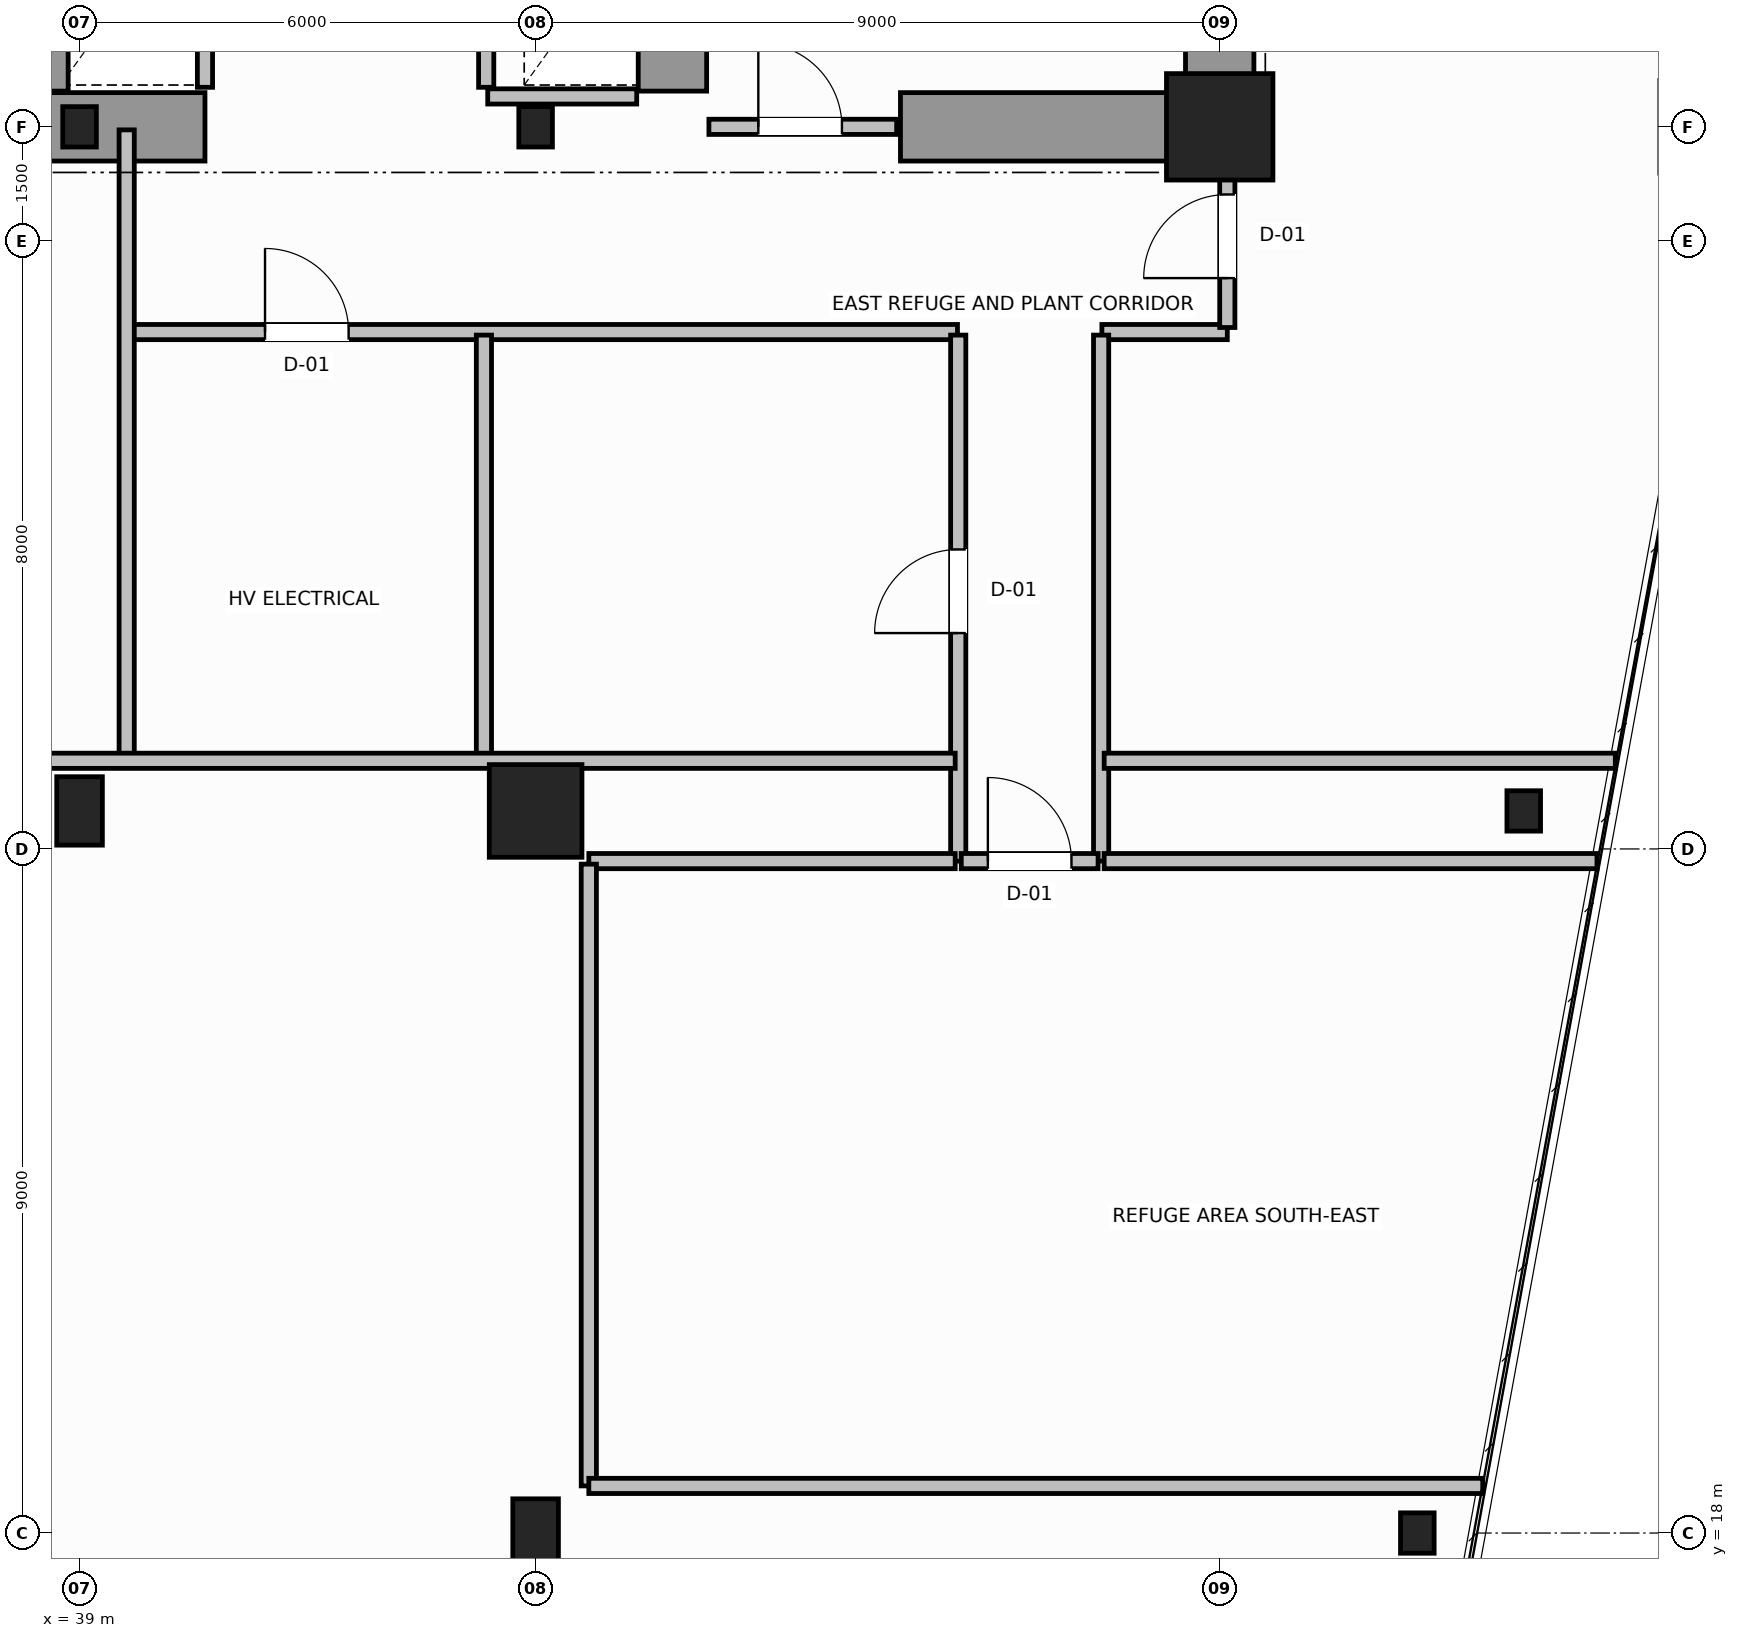
"""IFC4 building model, lengths in metres.
Left out: names, types, materials, properties, quantities, classifications, styles, units other than length and angle.
Written with IfcOpenShell. Run it as: python <this file> out.ifc"""

import sys

from ifc_helpers import new_model, si_unit, direction, frame, frame_2d, origin, origin_2d, place, context, subcontext, project, spatial, rectangle, hollow_rectangle, hollow_circle, i_section, extrude, source, transform, mapped, element, fill, save


model = new_model("IFC4")
c1 = context("Model", 3, precision=1e-05, world=origin(), true_north=direction((0.0, 1.0)))
c2 = subcontext(c1, "Body", "Model", "MODEL_VIEW")
j1 = project(units=[si_unit("LENGTHUNIT", "METRE"), si_unit("PLANEANGLEUNIT", "RADIAN")], contexts=[c1])
p1 = place(None, origin())
s1 = spatial("IfcSite", under=j1, at=p1, CompositionType="ELEMENT")
p2 = place(p1, origin())
s2 = spatial("IfcBuilding", under=s1, at=p2, CompositionType="ELEMENT")
p3 = place(p2, frame((0.0, 0.0, 83.4)))
s3 = spatial("IfcBuildingStorey", under=s2, at=p3, CompositionType="ELEMENT", Elevation=83.4)
m1 = source(origin(), c2, "Body", "SweptSolid", [
    extrude(i_section(OverallWidth=0.442, OverallDepth=0.531, WebThickness=0.065, FlangeThickness=0.076, FilletRadius=0.015, at=origin_2d()), origin(), (0.0, 0.0, 1.0), 4.8),
])
for number, where, z_axis, x_axis in (
    (1, (39.0, 36.5, 0.0), (0.0, 0.0, 1.0), (1.0, 0.0, 0.0)),
    (2, (45.0, 36.5, 0.0), (0.0, 0.0, 1.0), (1.0, 0.0, 0.0)),
):
    element("IfcColumn", number, at=place(p3, frame(where, z_axis=z_axis, x_axis=x_axis)), inside=s3, PredefinedType="COLUMN", context=c2, shape_type="MappedRepresentation", body=[
        mapped(m1, transform((0.0, 0.0, 0.0), scale=1.0)),
    ])
m2 = source(origin(), c2, "Body", "SweptSolid", [
    extrude(rectangle(XDim=1.4, YDim=1.4, at=origin_2d()), origin(), (0.0, 0.0, 1.0), 4.8),
])
p4 = place(p3, frame((54.0, 36.5, 0.0), z_axis=(0.0, 0.0, 1.0), x_axis=(1.0, 0.0, 0.0)))
e3 = element("IfcColumn", 3, at=p4, inside=s3, PredefinedType="COLUMN", context=c2, shape_type="MappedRepresentation", body=[
    mapped(m2, transform((0.0, 0.0, 0.0), scale=1.0)),
])
m3 = source(origin(), c2, "Body", "SweptSolid", [
    extrude(i_section(OverallWidth=0.442, OverallDepth=0.531, WebThickness=0.065, FlangeThickness=0.076, FilletRadius=0.015, at=origin_2d()), origin(), (0.0, 0.0, 1.0), 4.8),
])
for number, where, z_axis, x_axis in (
    (4, (58.0, 27.5, 0.0), (0.0, 0.0, 1.0), (1.0, 0.0, 0.0)),
    (5, (56.6, 18.0, 0.0), (0.0, 0.0, 1.0), (1.0, 0.0, 0.0)),
):
    element("IfcColumn", number, at=place(p3, frame(where, z_axis=z_axis, x_axis=x_axis)), inside=s3, PredefinedType="COLUMN", context=c2, shape_type="MappedRepresentation", body=[
        mapped(m3, transform((0.0, 0.0, 0.0), scale=1.0)),
    ])
m4 = source(origin(), c2, "Body", "SweptSolid", [
    extrude(hollow_rectangle(XDim=0.6, YDim=0.9, WallThickness=0.04, InnerFilletRadius=0.04, OuterFilletRadius=0.08, at=origin_2d()), origin(), (0.0, 0.0, 1.0), 4.8),
])
p5 = place(p3, frame((39.0, 27.5, 0.0), z_axis=(0.0, 0.0, 1.0), x_axis=(1.0, 0.0, 0.0)))
e6 = element("IfcColumn", 6, at=p5, inside=s3, PredefinedType="COLUMN", context=c2, shape_type="MappedRepresentation", body=[
    mapped(m4, transform((0.0, 0.0, 0.0), scale=1.0)),
])
m5 = source(origin(), c2, "Body", "SweptSolid", [
    extrude(hollow_circle(Radius=0.61, WallThickness=0.05, at=origin_2d()), origin(), (0.0, 0.0, 1.0), 4.8),
])
p6 = place(p3, frame((45.0, 27.5, 0.0), z_axis=(0.0, 0.0, 1.0), x_axis=(1.0, 0.0, 0.0)))
e7 = element("IfcColumn", 7, at=p6, inside=s3, PredefinedType="COLUMN", context=c2, shape_type="MappedRepresentation", body=[
    mapped(m5, transform((0.0, 0.0, 0.0), scale=1.0)),
])
p7 = place(p3, frame((45.0, 18.0, 0.0), z_axis=(0.0, 0.0, 1.0), x_axis=(1.0, 0.0, 0.0)))
e8 = element("IfcColumn", 8, at=p7, inside=s3, PredefinedType="COLUMN", context=c2, shape_type="MappedRepresentation", body=[
    mapped(m4, transform((0.0, 0.0, 0.0), scale=1.0)),
])
p8 = place(p3, frame((54.0, 36.5, 0.0), z_axis=(0.0, 0.0, 1.0), x_axis=(0.0, 1.0, 0.0)))
e9 = element("IfcWall", 9, at=p8, inside=s3, PredefinedType="SHEAR", context=c2, shape_type="SweptSolid", body=[
    extrude(rectangle(XDim=14.5, YDim=0.9, at=frame_2d((7.25, 0.0))), origin(), (0.0, 0.0, 1.0), 4.8),
])
p9 = place(p3, frame((36.15, 36.5, 0.0), z_axis=(0.0, 0.0, 1.0), x_axis=(1.0, 0.0, 0.0)))
e10 = element("IfcWall", 10, at=p9, inside=s3, PredefinedType="SHEAR", context=c2, shape_type="SweptSolid", body=[
    extrude(rectangle(XDim=4.5, YDim=0.9, at=frame_2d((2.25, 0.0))), origin(), (0.0, 0.0, 1.0), 4.8),
])
p10 = place(p3, frame((49.8, 36.5, 0.0), z_axis=(0.0, 0.0, 1.0), x_axis=(1.0, 0.0, 0.0)))
e11 = element("IfcWall", 11, at=p10, inside=s3, PredefinedType="SHEAR", context=c2, shape_type="SweptSolid", body=[
    extrude(rectangle(XDim=3.73, YDim=0.9, at=frame_2d((1.865, 0.0))), origin(), (0.0, 0.0, 1.0), 3.34),
])
p11 = place(p3, frame((38.4, 36.97, 0.0), z_axis=(0.0, 0.0, 1.0), x_axis=(0.0, 1.0, 0.0)))
e12 = element("IfcWall", 12, at=p11, inside=s3, PredefinedType="SHEAR", context=c2, shape_type="SweptSolid", body=[
    extrude(rectangle(XDim=9.23, YDim=0.9, at=frame_2d((4.615, 0.0))), origin(), (0.0, 0.0, 1.0), 4.8),
])
p12 = place(p11, frame((4.05, 0.0, 0.0)))
e13 = element("IfcOpeningElement", 13, at=p12, cuts=e12, PredefinedType="OPENING", context=c2, shape_type="SweptSolid", body=[
    extrude(rectangle(XDim=1.1, YDim=2.15, at=frame_2d((0.55, 1.075))), frame((0.0, 0.46, 0.0), z_axis=(0.0, -1.0, 0.0), x_axis=(1.0, 0.0, 0.0)), (0.0, 0.0, 1.0), 0.92),
])
p13 = place(p3, frame((46.8, 36.97, 0.0), z_axis=(0.0, 0.0, 1.0), x_axis=(0.0, 1.0, 0.0)))
e14 = element("IfcWall", 14, at=p13, inside=s3, PredefinedType="SHEAR", context=c2, shape_type="SweptSolid", body=[
    extrude(rectangle(XDim=9.23, YDim=0.9, at=frame_2d((4.615, 0.0))), origin(), (0.0, 0.0, 1.0), 4.8),
])
p14 = place(p3, frame((47.28, 36.5, 0.0), z_axis=(0.0, 0.0, 1.0), x_axis=(1.0, 0.0, 0.0)))
e15 = element("IfcWall", 15, at=p14, inside=s3, PredefinedType="SOLIDWALL", context=c2, shape_type="SweptSolid", body=[
    extrude(rectangle(XDim=2.47, YDim=0.2, at=frame_2d((1.235, 0.0))), origin(), (0.0, 0.0, 1.0), 3.33),
])
p15 = place(p14, frame((0.65, 0.0, 0.0)))
e16 = element("IfcOpeningElement", 16, at=p15, cuts=e15, PredefinedType="OPENING", context=c2, shape_type="SweptSolid", body=[
    extrude(rectangle(XDim=1.1, YDim=2.15, at=frame_2d((0.55, 1.075))), frame((0.0, 0.11, 0.0), z_axis=(0.0, -1.0, 0.0), x_axis=(1.0, 0.0, 0.0)), (0.0, 0.0, 1.0), 0.22),
])
p16 = place(p3, frame((40.65, 37.02, 0.0), z_axis=(0.0, 0.0, 1.0), x_axis=(0.0, 1.0, 0.0)))
e17 = element("IfcWall", 17, at=p16, inside=s3, PredefinedType="SOLIDWALL", context=c2, shape_type="SweptSolid", body=[
    extrude(rectangle(XDim=2.56, YDim=0.2, at=frame_2d((1.28, 0.0))), origin(), (0.0, 0.0, 1.0), 4.54),
])
p17 = place(p3, frame((44.37, 36.9, 0.0), z_axis=(0.0, 0.0, 1.0), x_axis=(1.0, 0.0, 0.0)))
e18 = element("IfcWall", 18, at=p17, inside=s3, PredefinedType="SOLIDWALL", context=c2, shape_type="SweptSolid", body=[
    extrude(rectangle(XDim=1.96, YDim=0.2, at=frame_2d((0.98, 0.0))), origin(), (0.0, 0.0, 1.0), 3.33),
])
p18 = place(p3, frame((44.35, 37.02, 0.0), z_axis=(0.0, 0.0, 1.0), x_axis=(0.0, 1.0, 0.0)))
e19 = element("IfcWall", 19, at=p18, inside=s3, PredefinedType="SOLIDWALL", context=c2, shape_type="SweptSolid", body=[
    extrude(rectangle(XDim=2.56, YDim=0.2, at=frame_2d((1.28, 0.0))), origin(), (0.0, 0.0, 1.0), 4.54),
])
p19 = place(p3, frame((39.64, 33.8, 0.0), z_axis=(0.0, 0.0, 1.0), x_axis=(1.0, 0.0, 0.0)))
e20 = element("IfcWall", 20, at=p19, inside=s3, PredefinedType="SOLIDWALL", context=c2, shape_type="SweptSolid", body=[
    extrude(rectangle(XDim=10.91, YDim=0.2, at=frame_2d((5.455, 0.0))), origin(), (0.0, 0.0, 1.0), 4.03),
])
p20 = place(p19, frame((1.8, 0.0, 0.0)))
e21 = element("IfcOpeningElement", 21, at=p20, cuts=e20, PredefinedType="OPENING", context=c2, shape_type="SweptSolid", body=[
    extrude(rectangle(XDim=1.1, YDim=2.15, at=frame_2d((0.55, 1.075))), frame((0.0, 0.11, 0.0), z_axis=(0.0, -1.0, 0.0), x_axis=(1.0, 0.0, 0.0)), (0.0, 0.0, 1.0), 0.22),
])
p21 = place(p3, frame((52.45, 33.8, 0.0), z_axis=(0.0, 0.0, 1.0), x_axis=(1.0, 0.0, 0.0)))
e22 = element("IfcWall", 22, at=p21, inside=s3, PredefinedType="SOLIDWALL", context=c2, shape_type="SweptSolid", body=[
    extrude(rectangle(XDim=1.65, YDim=0.2, at=frame_2d((0.825, 0.0))), origin(), (0.0, 0.0, 1.0), 4.03),
])
p22 = place(p3, frame((54.1, 33.86, 0.0), z_axis=(0.0, 0.0, 1.0), x_axis=(0.0, 1.0, 0.0)))
e23 = element("IfcWall", 23, at=p22, inside=s3, PredefinedType="SOLIDWALL", context=c2, shape_type="SweptSolid", body=[
    extrude(rectangle(XDim=2.58, YDim=0.2, at=frame_2d((1.29, 0.0))), origin(), (0.0, 0.0, 1.0), 4.54),
])
p23 = place(p22, frame((0.65, 0.0, 0.0)))
e24 = element("IfcOpeningElement", 24, at=p23, cuts=e23, PredefinedType="OPENING", context=c2, shape_type="SweptSolid", body=[
    extrude(rectangle(XDim=1.1, YDim=2.15, at=frame_2d((0.55, 1.075))), frame((0.0, 0.11, 0.0), z_axis=(0.0, -1.0, 0.0), x_axis=(1.0, 0.0, 0.0)), (0.0, 0.0, 1.0), 0.22),
])
p24 = place(p3, frame((50.56, 26.84, 0.0), z_axis=(0.0, 0.0, 1.0), x_axis=(0.0, 1.0, 0.0)))
e25 = element("IfcWall", 25, at=p24, inside=s3, PredefinedType="SOLIDWALL", context=c2, shape_type="SweptSolid", body=[
    extrude(rectangle(XDim=6.92, YDim=0.2, at=frame_2d((3.46, 0.0))), origin(), (0.0, 0.0, 1.0), 4.54),
])
p25 = place(p24, frame((3.0, 0.0, 0.0)))
e26 = element("IfcOpeningElement", 26, at=p25, cuts=e25, PredefinedType="OPENING", context=c2, shape_type="SweptSolid", body=[
    extrude(rectangle(XDim=1.1, YDim=2.15, at=frame_2d((0.55, 1.075))), frame((0.0, 0.11, 0.0), z_axis=(0.0, -1.0, 0.0), x_axis=(1.0, 0.0, 0.0)), (0.0, 0.0, 1.0), 0.22),
])
p26 = place(p3, frame((52.44, 26.84, 0.0), z_axis=(0.0, 0.0, 1.0), x_axis=(0.0, 1.0, 0.0)))
e27 = element("IfcWall", 27, at=p26, inside=s3, PredefinedType="SOLIDWALL", context=c2, shape_type="SweptSolid", body=[
    extrude(rectangle(XDim=6.92, YDim=0.2, at=frame_2d((3.46, 0.0))), origin(), (0.0, 0.0, 1.0), 4.54),
])
p27 = place(p3, frame((50.6, 26.84, 0.0), z_axis=(0.0, 0.0, 1.0), x_axis=(1.0, 0.0, 0.0)))
e28 = element("IfcWall", 28, at=p27, inside=s3, PredefinedType="SOLIDWALL", context=c2, shape_type="SweptSolid", body=[
    extrude(rectangle(XDim=1.8, YDim=0.2, at=frame_2d((0.9, 0.0))), origin(), (0.0, 0.0, 1.0), 4.54),
])
p28 = place(p27, frame((0.35, 0.0, 0.0)))
e29 = element("IfcOpeningElement", 29, at=p28, cuts=e28, PredefinedType="OPENING", context=c2, shape_type="SweptSolid", body=[
    extrude(rectangle(XDim=1.1, YDim=2.15, at=frame_2d((0.55, 1.075))), frame((0.0, 0.11, 0.0), z_axis=(0.0, -1.0, 0.0), x_axis=(1.0, 0.0, 0.0)), (0.0, 0.0, 1.0), 0.22),
])
p29 = place(p3, frame((39.62, 28.16, 0.0), z_axis=(0.0, 0.0, 1.0), x_axis=(0.0, 1.0, 0.0)))
e30 = element("IfcWall", 30, at=p29, inside=s3, PredefinedType="SOLIDWALL", context=c2, shape_type="SweptSolid", body=[
    extrude(rectangle(XDim=8.3, YDim=0.2, at=frame_2d((4.15, 0.0))), origin(), (0.0, 0.0, 1.0), 4.54),
])
p30 = place(p3, frame((44.32, 28.16, 0.0), z_axis=(0.0, 0.0, 1.0), x_axis=(0.0, 1.0, 0.0)))
e31 = element("IfcWall", 31, at=p30, inside=s3, PredefinedType="SOLIDWALL", context=c2, shape_type="SweptSolid", body=[
    extrude(rectangle(XDim=5.6, YDim=0.2, at=frame_2d((2.8, 0.0))), origin(), (0.0, 0.0, 1.0), 4.54),
])
p31 = place(p3, frame((17.48, 28.16, 0.0), z_axis=(0.0, 0.0, 1.0), x_axis=(1.0, 0.0, 0.0)))
e32 = element("IfcWall", 32, at=p31, inside=s3, PredefinedType="SOLIDWALL", context=c2, shape_type="SweptSolid", body=[
    extrude(rectangle(XDim=33.04, YDim=0.2, at=frame_2d((16.52, 0.0))), origin(), (0.0, 0.0, 1.0), 4.54),
])
p32 = place(p3, frame((52.48, 28.16, 0.0), z_axis=(0.0, 0.0, 1.0), x_axis=(1.0, 0.0, 0.0)))
e33 = element("IfcWall", 33, at=p32, inside=s3, PredefinedType="SOLIDWALL", context=c2, shape_type="SweptSolid", body=[
    extrude(rectangle(XDim=6.725, YDim=0.2, at=frame_2d((3.362, 0.0))), origin(), (0.0, 0.0, 1.0), 4.54),
])
p33 = place(p3, frame((45.7, 26.84, 0.0), z_axis=(0.0, 0.0, 1.0), x_axis=(1.0, 0.0, 0.0)))
e34 = element("IfcWall", 34, at=p33, inside=s3, PredefinedType="SOLIDWALL", context=c2, shape_type="SweptSolid", body=[
    extrude(rectangle(XDim=4.82, YDim=0.2, at=frame_2d((2.41, 0.0))), origin(), (0.0, 0.0, 1.0), 4.54),
])
p34 = place(p3, frame((52.48, 26.84, 0.0), z_axis=(0.0, 0.0, 1.0), x_axis=(1.0, 0.0, 0.0)))
e35 = element("IfcWall", 35, at=p34, inside=s3, PredefinedType="SOLIDWALL", context=c2, shape_type="SweptSolid", body=[
    extrude(rectangle(XDim=6.483, YDim=0.2, at=frame_2d((3.242, 0.0))), origin(), (0.0, 0.0, 1.0), 4.54),
])
p35 = place(p3, frame((45.7, 18.62, 0.0), z_axis=(0.0, 0.0, 1.0), x_axis=(0.0, 1.0, 0.0)))
e36 = element("IfcWall", 36, at=p35, inside=s3, PredefinedType="SOLIDWALL", context=c2, shape_type="SweptSolid", body=[
    extrude(rectangle(XDim=8.18, YDim=0.2, at=frame_2d((4.09, 0.0))), origin(), (0.0, 0.0, 1.0), 4.54),
])
p36 = place(p3, frame((45.7, 18.62, 0.0), z_axis=(0.0, 0.0, 1.0), x_axis=(1.0, 0.0, 0.0)))
e37 = element("IfcWall", 37, at=p36, inside=s3, PredefinedType="SOLIDWALL", context=c2, shape_type="SweptSolid", body=[
    extrude(rectangle(XDim=11.761, YDim=0.2, at=frame_2d((5.88, 0.0))), origin(), (0.0, 0.0, 1.0), 4.54),
])
m6 = source(origin(), c2, "Body", "SweptSolid", [
    extrude(rectangle(XDim=1.1, YDim=2.15, at=frame_2d((0.55, 1.075))), frame((0.0, 0.025, 0.0), z_axis=(0.0, -1.0, 0.0), x_axis=(1.0, 0.0, 0.0)), (0.0, 0.0, 1.0), 0.05),
])
p37 = place(p15, origin())
e38 = element("IfcDoor", 38, at=p37, inside=s3, OperationType="SINGLE_SWING_LEFT", PredefinedType="DOOR", context=c2, shape_type="MappedRepresentation", body=[
    mapped(m6, transform((0.0, 0.0, 0.0), scale=1.0)),
])
fill(e16, e38)
p38 = place(p23, origin())
e39 = element("IfcDoor", 39, at=p38, inside=s3, OperationType="SINGLE_SWING_RIGHT", PredefinedType="DOOR", context=c2, shape_type="MappedRepresentation", body=[
    mapped(m6, transform((0.0, 0.0, 0.0), scale=1.0)),
])
fill(e24, e39)
p39 = place(p25, origin())
e40 = element("IfcDoor", 40, at=p39, inside=s3, OperationType="SINGLE_SWING_LEFT", PredefinedType="DOOR", context=c2, shape_type="MappedRepresentation", body=[
    mapped(m6, transform((0.0, 0.0, 0.0), scale=1.0)),
])
fill(e26, e40)
p40 = place(p28, origin())
e41 = element("IfcDoor", 41, at=p40, inside=s3, OperationType="SINGLE_SWING_RIGHT", PredefinedType="DOOR", context=c2, shape_type="MappedRepresentation", body=[
    mapped(m6, transform((0.0, 0.0, 0.0), scale=1.0)),
])
fill(e29, e41)
p41 = place(p20, origin())
e42 = element("IfcDoor", 42, at=p41, inside=s3, OperationType="SINGLE_SWING_LEFT", PredefinedType="DOOR", context=c2, shape_type="MappedRepresentation", body=[
    mapped(m6, transform((0.0, 0.0, 0.0), scale=1.0)),
])
fill(e21, e42)
save(model, sys.argv[1])
